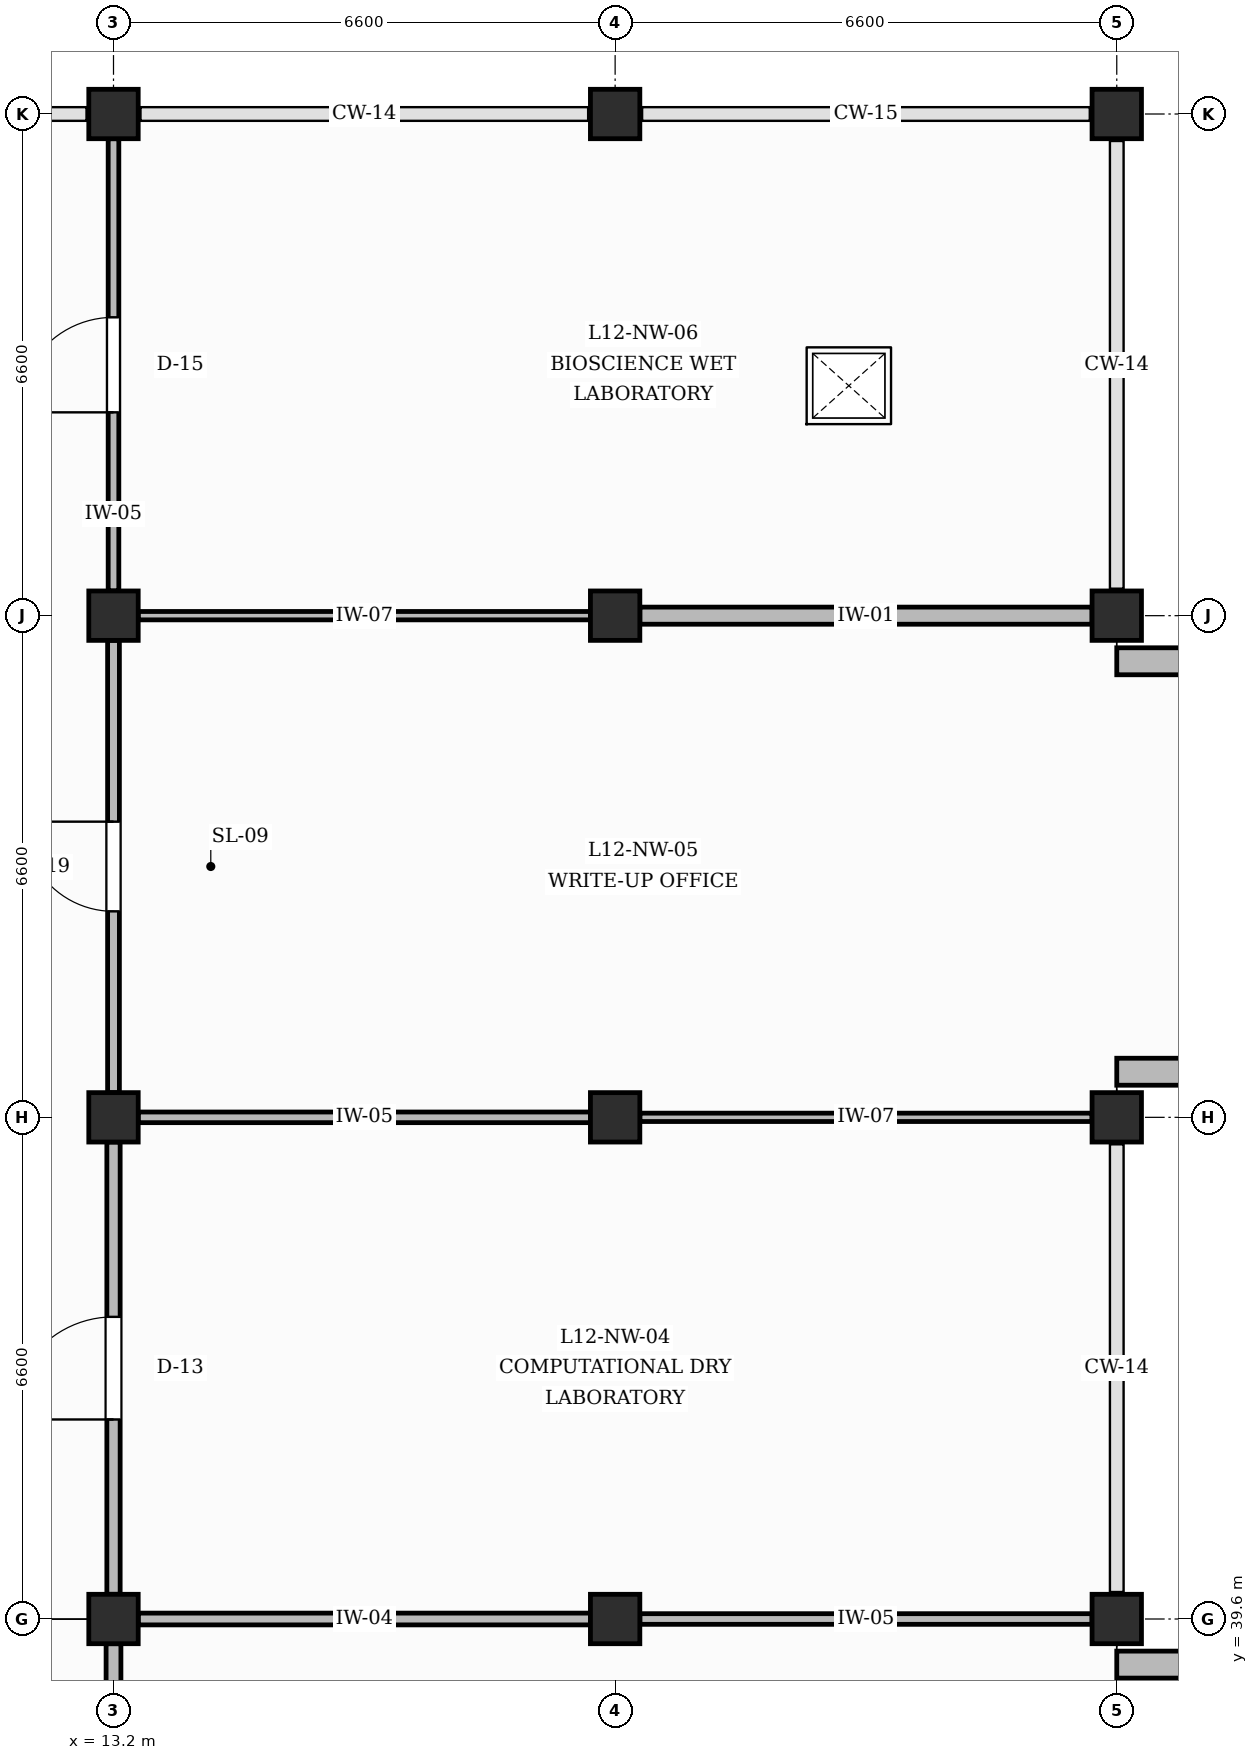
"""IFC4 building model, lengths in metres.
Left out: names, types, materials, properties, quantities, classifications, styles, units other than length and angle.
Written with IfcOpenShell. Run it as: python <this file> out.ifc"""

import sys

from ifc_helpers import new_model, si_unit, direction, frame, frame_2d, origin, origin_2d, place, context, subcontext, project, spatial, rectangle, extrude, element, fill, save


model = new_model("IFC4")
c1 = context("Model", 3, precision=1e-05, world=origin(), true_north=direction((0.0, 1.0)))
c2 = subcontext(c1, "Body", "Model", "MODEL_VIEW")
j1 = project(units=[si_unit("LENGTHUNIT", "METRE"), si_unit("PLANEANGLEUNIT", "RADIAN")], contexts=[c1])
p1 = place(None, origin())
s1 = spatial("IfcSite", under=j1, at=p1, CompositionType="ELEMENT")
p2 = place(p1, origin())
s2 = spatial("IfcBuilding", under=s1, at=p2, CompositionType="ELEMENT")
p3 = place(p2, frame((0.0, 0.0, 52.2)))
s3 = spatial("IfcBuildingStorey", under=s2, at=p3, CompositionType="ELEMENT", Elevation=52.2)
for number, where, z_axis, x_axis in (
    (1, (13.2, 39.6, 0.0), (0.0, 0.0, 1.0), (1.0, 0.0, 0.0)),
    (2, (13.2, 46.2, 0.0), (0.0, 0.0, 1.0), (1.0, 0.0, 0.0)),
    (3, (13.2, 52.8, 0.0), (0.0, 0.0, 1.0), (1.0, 0.0, 0.0)),
    (4, (13.2, 59.4, 0.0), (0.0, 0.0, 1.0), (1.0, 0.0, 0.0)),
    (5, (19.8, 39.6, 0.0), (0.0, 0.0, 1.0), (1.0, 0.0, 0.0)),
    (6, (19.8, 46.2, 0.0), (0.0, 0.0, 1.0), (1.0, 0.0, 0.0)),
    (7, (19.8, 52.8, 0.0), (0.0, 0.0, 1.0), (1.0, 0.0, 0.0)),
    (8, (19.8, 59.4, 0.0), (0.0, 0.0, 1.0), (1.0, 0.0, 0.0)),
    (9, (26.4, 39.6, 0.0), (0.0, 0.0, 1.0), (1.0, 0.0, 0.0)),
    (10, (26.4, 46.2, 0.0), (0.0, 0.0, 1.0), (1.0, 0.0, 0.0)),
    (11, (26.4, 52.8, 0.0), (0.0, 0.0, 1.0), (1.0, 0.0, 0.0)),
    (12, (26.4, 59.4, 0.0), (0.0, 0.0, 1.0), (1.0, 0.0, 0.0)),
):
    element("IfcColumn", number, at=place(p3, frame(where, z_axis=z_axis, x_axis=x_axis)), inside=s3, PredefinedType="COLUMN", context=c2, shape_type="SweptSolid", body=[
        extrude(rectangle(XDim=0.65, YDim=0.65, at=origin_2d()), origin(), (0.0, 0.0, 1.0), 4.2),
    ])
for number, where, z_axis, x_axis in (
    (13, (26.4, 39.0, 0.0), (0.0, 0.0, 1.0), (1.0, 0.0, 0.0)),
    (14, (26.4, 46.8, 0.0), (0.0, 0.0, 1.0), (1.0, 0.0, 0.0)),
    (15, (26.4, 52.2, 0.0), (0.0, 0.0, 1.0), (1.0, 0.0, 0.0)),
):
    element("IfcWall", number, at=place(p3, frame(where, z_axis=z_axis, x_axis=x_axis)), inside=s3, PredefinedType="SOLIDWALL", context=c2, shape_type="SweptSolid", body=[
        extrude(rectangle(XDim=2.0, YDim=0.355, at=frame_2d((1.0, 0.0))), origin(), (0.0, 0.0, 1.0), 3.3),
    ])
p4 = place(p3, frame((13.2, 33.325, 0.0), z_axis=(0.0, 0.0, 1.0), x_axis=(0.0, 1.0, 0.0)))
e16 = element("IfcWall", 16, at=p4, inside=s3, PredefinedType="PARTITIONING", context=c2, shape_type="SweptSolid", body=[
    extrude(rectangle(XDim=5.95, YDim=0.195, at=frame_2d((2.975, 0.0))), origin(), (0.0, 0.0, 1.0), 3.3),
])
p5 = place(p4, frame((2.275, 0.0, 0.0)))
e17 = element("IfcOpeningElement", 17, at=p5, cuts=e16, PredefinedType="OPENING", context=c2, shape_type="SweptSolid", body=[
    extrude(rectangle(XDim=1.4, YDim=2.25, at=frame_2d((0.7, 1.125))), frame((0.0, 0.107, 0.0), z_axis=(0.0, -1.0, 0.0), x_axis=(1.0, 0.0, 0.0)), (0.0, 0.0, 1.0), 0.215),
])
p6 = place(p3, frame((13.2, 39.925, 0.0), z_axis=(0.0, 0.0, 1.0), x_axis=(0.0, 1.0, 0.0)))
e18 = element("IfcWall", 18, at=p6, inside=s3, PredefinedType="PARTITIONING", context=c2, shape_type="SweptSolid", body=[
    extrude(rectangle(XDim=5.95, YDim=0.175, at=frame_2d((2.975, 0.0))), origin(), (0.0, 0.0, 1.0), 3.3),
])
p7 = place(p6, frame((2.3, 0.0, 0.0)))
e19 = element("IfcOpeningElement", 19, at=p7, cuts=e18, PredefinedType="OPENING", context=c2, shape_type="SweptSolid", body=[
    extrude(rectangle(XDim=1.35, YDim=2.3, at=frame_2d((0.675, 1.15))), frame((0.0, 0.097, 0.0), z_axis=(0.0, -1.0, 0.0), x_axis=(1.0, 0.0, 0.0)), (0.0, 0.0, 1.0), 0.195),
])
p8 = place(p3, frame((13.2, 46.525, 0.0), z_axis=(0.0, 0.0, 1.0), x_axis=(0.0, 1.0, 0.0)))
e20 = element("IfcWall", 20, at=p8, inside=s3, PredefinedType="PARTITIONING", context=c2, shape_type="SweptSolid", body=[
    extrude(rectangle(XDim=5.95, YDim=0.155, at=frame_2d((2.975, 0.0))), origin(), (0.0, 0.0, 1.0), 3.3),
])
p9 = place(p8, frame((2.385, 0.0, 0.0)))
e21 = element("IfcOpeningElement", 21, at=p9, cuts=e20, PredefinedType="OPENING", context=c2, shape_type="SweptSolid", body=[
    extrude(rectangle(XDim=1.18, YDim=2.2, at=frame_2d((0.59, 1.1))), frame((0.0, 0.087, 0.0), z_axis=(0.0, -1.0, 0.0), x_axis=(1.0, 0.0, 0.0)), (0.0, 0.0, 1.0), 0.175),
])
p10 = place(p3, frame((13.2, 53.125, 0.0), z_axis=(0.0, 0.0, 1.0), x_axis=(0.0, 1.0, 0.0)))
e22 = element("IfcWall", 22, at=p10, inside=s3, PredefinedType="PARTITIONING", context=c2, shape_type="SweptSolid", body=[
    extrude(rectangle(XDim=5.95, YDim=0.14, at=frame_2d((2.975, 0.0))), origin(), (0.0, 0.0, 1.0), 3.3),
])
p11 = place(p10, frame((2.35, 0.0, 0.0)))
e23 = element("IfcOpeningElement", 23, at=p11, cuts=e22, PredefinedType="OPENING", context=c2, shape_type="SweptSolid", body=[
    extrude(rectangle(XDim=1.25, YDim=2.25, at=frame_2d((0.625, 1.125))), frame((0.0, 0.08, 0.0), z_axis=(0.0, -1.0, 0.0), x_axis=(1.0, 0.0, 0.0)), (0.0, 0.0, 1.0), 0.16),
])
p12 = place(p3, frame((13.525, 39.6, 0.0), z_axis=(0.0, 0.0, 1.0), x_axis=(1.0, 0.0, 0.0)))
e24 = element("IfcWall", 24, at=p12, inside=s3, PredefinedType="PARTITIONING", context=c2, shape_type="SweptSolid", body=[
    extrude(rectangle(XDim=5.95, YDim=0.155, at=frame_2d((2.975, 0.0))), origin(), (0.0, 0.0, 1.0), 3.3),
])
p13 = place(p3, frame((13.525, 46.2, 0.0), z_axis=(0.0, 0.0, 1.0), x_axis=(1.0, 0.0, 0.0)))
e25 = element("IfcWall", 25, at=p13, inside=s3, PredefinedType="PARTITIONING", context=c2, shape_type="SweptSolid", body=[
    extrude(rectangle(XDim=5.95, YDim=0.14, at=frame_2d((2.975, 0.0))), origin(), (0.0, 0.0, 1.0), 3.3),
])
p14 = place(p3, frame((13.525, 52.8, 0.0), z_axis=(0.0, 0.0, 1.0), x_axis=(1.0, 0.0, 0.0)))
e26 = element("IfcWall", 26, at=p14, inside=s3, PredefinedType="PARTITIONING", context=c2, shape_type="SweptSolid", body=[
    extrude(rectangle(XDim=5.95, YDim=0.11, at=frame_2d((2.975, 0.0))), origin(), (0.0, 0.0, 1.0), 3.3),
])
p15 = place(p3, frame((20.125, 39.6, 0.0), z_axis=(0.0, 0.0, 1.0), x_axis=(1.0, 0.0, 0.0)))
e27 = element("IfcWall", 27, at=p15, inside=s3, PredefinedType="PARTITIONING", context=c2, shape_type="SweptSolid", body=[
    extrude(rectangle(XDim=5.95, YDim=0.14, at=frame_2d((2.975, 0.0))), origin(), (0.0, 0.0, 1.0), 3.45),
])
p16 = place(p3, frame((20.125, 46.2, 0.0), z_axis=(0.0, 0.0, 1.0), x_axis=(1.0, 0.0, 0.0)))
e28 = element("IfcWall", 28, at=p16, inside=s3, PredefinedType="PARTITIONING", context=c2, shape_type="SweptSolid", body=[
    extrude(rectangle(XDim=5.95, YDim=0.11, at=frame_2d((2.975, 0.0))), origin(), (0.0, 0.0, 1.0), 3.45),
])
p17 = place(p3, frame((20.125, 52.8, 0.0), z_axis=(0.0, 0.0, 1.0), x_axis=(1.0, 0.0, 0.0)))
e29 = element("IfcWall", 29, at=p17, inside=s3, PredefinedType="PARTITIONING", context=c2, shape_type="SweptSolid", body=[
    extrude(rectangle(XDim=5.95, YDim=0.225, at=frame_2d((2.975, 0.0))), origin(), (0.0, 0.0, 1.0), 3.45),
])
p18 = place(p7, origin())
e30 = element("IfcDoor", 30, at=p18, inside=s3, OperationType="SINGLE_SWING_LEFT", PredefinedType="DOOR", context=c2, shape_type="SweptSolid", body=[
    extrude(rectangle(XDim=1.35, YDim=2.3, at=frame_2d((0.675, 1.15))), frame((0.0, 0.025, 0.0), z_axis=(0.0, -1.0, 0.0), x_axis=(1.0, 0.0, 0.0)), (0.0, 0.0, 1.0), 0.05),
])
fill(e19, e30)
p19 = place(p9, origin())
e31 = element("IfcDoor", 31, at=p19, inside=s3, OperationType="SINGLE_SWING_RIGHT", PredefinedType="DOOR", context=c2, shape_type="SweptSolid", body=[
    extrude(rectangle(XDim=1.18, YDim=2.2, at=frame_2d((0.59, 1.1))), frame((0.0, 0.025, 0.0), z_axis=(0.0, -1.0, 0.0), x_axis=(1.0, 0.0, 0.0)), (0.0, 0.0, 1.0), 0.05),
])
fill(e21, e31)
p20 = place(p11, origin())
e32 = element("IfcDoor", 32, at=p20, inside=s3, OperationType="SINGLE_SWING_LEFT", PredefinedType="DOOR", context=c2, shape_type="SweptSolid", body=[
    extrude(rectangle(XDim=1.25, YDim=2.25, at=frame_2d((0.625, 1.125))), frame((0.0, 0.025, 0.0), z_axis=(0.0, -1.0, 0.0), x_axis=(1.0, 0.0, 0.0)), (0.0, 0.0, 1.0), 0.05),
])
fill(e23, e32)
save(model, sys.argv[1])
